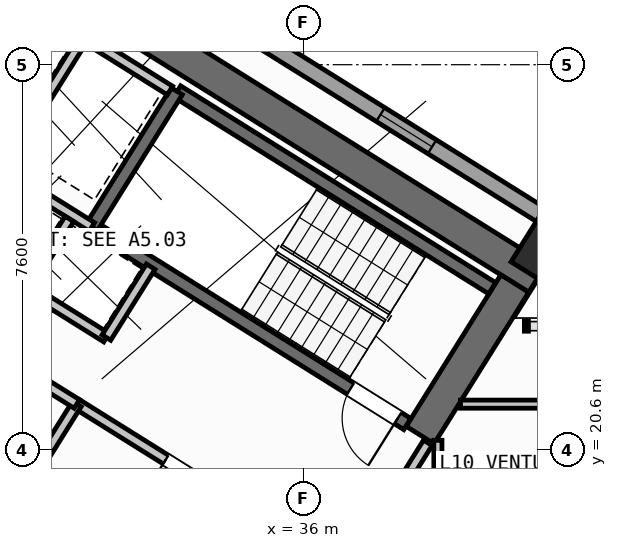
"""IFC4 building model, lengths in metres.
Left out: names, types, materials, properties, quantities, classifications, styles, units other than length and angle.
Written with IfcOpenShell. Run it as: python <this file> out.ifc"""

import sys

from ifc_helpers import new_model, si_unit, direction, frame, frame_2d, origin, origin_2d, place, context, subcontext, project, spatial, rectangle, hollow_rectangle, extrude, source, transform, mapped, element, fill, save


model = new_model("IFC4")
c1 = context("Model", 3, precision=1e-05, world=origin(), true_north=direction((0.0, 1.0)))
c2 = subcontext(c1, "Body", "Model", "MODEL_VIEW")
j1 = project(units=[si_unit("LENGTHUNIT", "METRE"), si_unit("PLANEANGLEUNIT", "RADIAN")], contexts=[c1])
p1 = place(None, origin())
s1 = spatial("IfcSite", under=j1, at=p1, CompositionType="ELEMENT")
p2 = place(p1, origin())
s2 = spatial("IfcBuilding", under=s1, at=p2, CompositionType="ELEMENT")
p3 = place(p2, frame((0.0, 0.0, 42.0)))
s3 = spatial("IfcBuildingStorey", under=s2, at=p3, CompositionType="ELEMENT", Elevation=42.0)
p4 = place(p3, frame((40.615, 23.983, 0.0), z_axis=(0.0, 0.0, 1.0), x_axis=(-0.848045953968, 0.529922692436, 0.0)))
e1 = element("IfcWall", 1, at=p4, inside=s3, PredefinedType="SHEAR", context=c2, shape_type="SweptSolid", body=[
    extrude(rectangle(XDim=13.24, YDim=0.65, at=frame_2d((6.62, 0.0))), origin(), (0.0, 0.0, 1.0), 3.35),
])
p5 = place(p3, frame((40.168, 23.88, 0.0), z_axis=(0.0, 0.0, 1.0), x_axis=(-0.529893103397, -0.8480644427, 0.0)))
e2 = element("IfcWall", 2, at=p5, inside=s3, PredefinedType="SHEAR", context=c2, shape_type="SweptSolid", body=[
    extrude(rectangle(XDim=3.525, YDim=0.65, at=frame_2d((1.763, 0.0))), origin(), (0.0, 0.0, 1.0), 3.35),
])
m1 = source(origin(), c2, "Body", "SweptSolid", [
    extrude(hollow_rectangle(XDim=1.0, YDim=1.0, WallThickness=0.04, at=origin_2d()), origin(), (0.0, 0.0, 1.0), 3.6),
])
p6 = place(p3, frame((40.783, 24.469, 0.0), z_axis=(0.0, 0.0, 1.0), x_axis=(-0.848048096156, 0.529919264233, 0.0)))
e3 = element("IfcColumn", 3, at=p6, inside=s3, PredefinedType="COLUMN", context=c2, shape_type="MappedRepresentation", body=[
    mapped(m1, transform((0.0, 0.0, 0.0), scale=1.0)),
])
p7 = place(p3, frame((14.138, 41.825, 0.0), z_axis=(0.0, 0.0, 1.0), x_axis=(0.848046498049, -0.529921821731, 0.0)))
e4 = element("IfcWall", 4, at=p7, inside=s3, PredefinedType="STANDARD", context=c2, shape_type="SweptSolid", body=[
    extrude(rectangle(XDim=31.588, YDim=0.32, at=frame_2d((15.794, 0.0))), origin(), (0.0, 0.0, 1.0), 3.35),
])
p8 = place(p7, frame((3.369, 0.0, 0.0)))
e5 = element("IfcOpeningElement", 5, at=p8, cuts=e4, PredefinedType="OPENING", context=c2, shape_type="SweptSolid", body=[
    extrude(rectangle(XDim=1.05, YDim=2.15, at=frame_2d((0.525, 1.075))), frame((0.0, 0.17, 0.0), z_axis=(0.0, -1.0, 0.0), x_axis=(1.0, 0.0, 0.0)), (0.0, 0.0, 1.0), 0.34),
])
p9 = place(p7, frame((0.946, 0.0, 0.85)))
e6 = element("IfcOpeningElement", 6, at=p9, cuts=e4, PredefinedType="OPENING", context=c2, shape_type="SweptSolid", body=[
    extrude(rectangle(XDim=1.8, YDim=1.5, at=frame_2d((0.9, 0.75))), frame((0.0, 0.17, 0.0), z_axis=(0.0, -1.0, 0.0), x_axis=(1.0, 0.0, 0.0)), (0.0, 0.0, 1.0), 0.34),
])
p10 = place(p7, frame((8.46, 0.0, 0.85)))
e7 = element("IfcOpeningElement", 7, at=p10, cuts=e4, PredefinedType="OPENING", context=c2, shape_type="SweptSolid", body=[
    extrude(rectangle(XDim=1.8, YDim=1.5, at=frame_2d((0.9, 0.75))), frame((0.0, 0.17, 0.0), z_axis=(0.0, -1.0, 0.0), x_axis=(1.0, 0.0, 0.0)), (0.0, 0.0, 1.0), 0.34),
])
p11 = place(p7, frame((13.899, 0.0, 0.85)))
e8 = element("IfcOpeningElement", 8, at=p11, cuts=e4, PredefinedType="OPENING", context=c2, shape_type="SweptSolid", body=[
    extrude(rectangle(XDim=1.5, YDim=1.5, at=frame_2d((0.75, 0.75))), frame((0.0, 0.17, 0.0), z_axis=(0.0, -1.0, 0.0), x_axis=(1.0, 0.0, 0.0)), (0.0, 0.0, 1.0), 0.34),
])
p12 = place(p7, frame((22.019, 0.0, 0.95)))
e9 = element("IfcOpeningElement", 9, at=p12, cuts=e4, PredefinedType="OPENING", context=c2, shape_type="SweptSolid", body=[
    extrude(rectangle(XDim=1.2, YDim=1.4, at=frame_2d((0.6, 0.7))), frame((0.0, 0.17, 0.0), z_axis=(0.0, -1.0, 0.0), x_axis=(1.0, 0.0, 0.0)), (0.0, 0.0, 1.0), 0.34),
])
p13 = place(p7, frame((27.569, 0.0, 0.95)))
e10 = element("IfcOpeningElement", 10, at=p13, cuts=e4, PredefinedType="OPENING", context=c2, shape_type="SweptSolid", body=[
    extrude(rectangle(XDim=1.2, YDim=1.4, at=frame_2d((0.6, 0.7))), frame((0.0, 0.17, 0.0), z_axis=(0.0, -1.0, 0.0), x_axis=(1.0, 0.0, 0.0)), (0.0, 0.0, 1.0), 0.34),
])
p14 = place(p3, frame((31.28, 18.261, 0.0), z_axis=(0.0, 0.0, 1.0), x_axis=(-0.848051618787, 0.529913626805, 0.0)))
e11 = element("IfcWall", 11, at=p14, inside=s3, PredefinedType="SHEAR", context=c2, shape_type="SweptSolid", body=[
    extrude(rectangle(XDim=7.46, YDim=0.26, at=frame_2d((3.73, 0.0))), origin(), (0.0, 0.0, 1.0), 3.35),
])
p15 = place(p14, frame((0.36, 0.0, 0.0)))
e12 = element("IfcOpeningElement", 12, at=p15, cuts=e11, PredefinedType="OPENING", context=c2, shape_type="SweptSolid", body=[
    extrude(rectangle(XDim=0.86, YDim=2.05, at=frame_2d((0.43, 1.025))), frame((0.0, 0.14, 0.0), z_axis=(0.0, -1.0, 0.0), x_axis=(1.0, 0.0, 0.0)), (0.0, 0.0, 1.0), 0.28),
])
p16 = place(p3, frame((39.721, 23.788, 0.0), z_axis=(0.0, 0.0, 1.0), x_axis=(-0.848054434086, 0.529909121291, 0.0)))
e13 = element("IfcWall", 13, at=p16, inside=s3, PredefinedType="SHEAR", context=c2, shape_type="SweptSolid", body=[
    extrude(rectangle(XDim=7.33, YDim=0.26, at=frame_2d((3.665, 0.0))), origin(), (0.0, 0.0, 1.0), 3.35),
])
p17 = place(p3, frame((38.046, 21.108, 0.0), z_axis=(0.0, 0.0, 1.0), x_axis=(-0.848054434086, 0.529909121291, 0.0)))
e14 = element("IfcWall", 14, at=p17, inside=s3, PredefinedType="SHEAR", context=c2, shape_type="SweptSolid", body=[
    extrude(rectangle(XDim=7.33, YDim=0.26, at=frame_2d((3.665, 0.0))), origin(), (0.0, 0.0, 1.0), 3.35),
])
p18 = place(p17, frame((0.22, 0.0, 0.0)))
e15 = element("IfcOpeningElement", 15, at=p18, cuts=e14, PredefinedType="OPENING", context=c2, shape_type="SweptSolid", body=[
    extrude(rectangle(XDim=1.1, YDim=2.1, at=frame_2d((0.55, 1.05))), frame((0.0, 0.14, 0.0), z_axis=(0.0, -1.0, 0.0), x_axis=(1.0, 0.0, 0.0)), (0.0, 0.0, 1.0), 0.28),
])
p19 = place(p3, frame((33.496, 27.677, 0.0), z_axis=(0.0, 0.0, 1.0), x_axis=(-0.529908658664, -0.84805472316, 0.0)))
e16 = element("IfcWall", 16, at=p19, inside=s3, PredefinedType="SHEAR", context=c2, shape_type="SweptSolid", body=[
    extrude(rectangle(XDim=3.16, YDim=0.26, at=frame_2d((1.58, 0.0))), origin(), (0.0, 0.0, 1.0), 3.35),
])
p20 = place(p3, frame((36.374, 18.474, 0.0), z_axis=(0.0, 0.0, 1.0), x_axis=(-0.848051071577, 0.529914502535, 0.0)))
e17 = element("IfcWall", 17, at=p20, inside=s3, PredefinedType="STANDARD", context=c2, shape_type="SweptSolid", body=[
    extrude(rectangle(XDim=5.718, YDim=0.2, at=frame_2d((2.859, 0.0))), origin(), (0.0, 0.0, 1.0), 3.34),
])
p21 = place(p20, frame((2.498, 0.0, 0.0)))
e18 = element("IfcOpeningElement", 18, at=p21, cuts=e17, PredefinedType="OPENING", context=c2, shape_type="SweptSolid", body=[
    extrude(rectangle(XDim=1.15, YDim=2.1, at=frame_2d((0.575, 1.05))), frame((0.0, 0.11, 0.0), z_axis=(0.0, -1.0, 0.0), x_axis=(1.0, 0.0, 0.0)), (0.0, 0.0, 1.0), 0.22),
])
p22 = place(p3, frame((31.822, 24.998, 0.0), z_axis=(0.0, 0.0, 1.0), x_axis=(-0.848058348634, 0.529902856485, 0.0)))
e19 = element("IfcWall", 19, at=p22, inside=s3, PredefinedType="STANDARD", context=c2, shape_type="SweptSolid", body=[
    extrude(rectangle(XDim=4.568, YDim=0.2, at=frame_2d((2.284, 0.0))), origin(), (0.0, 0.0, 1.0), 3.34),
])
p23 = place(p3, frame((32.108, 22.814, 0.0), z_axis=(0.0, 0.0, 1.0), x_axis=(-0.848042229521, 0.529928652696, 0.0)))
e20 = element("IfcWall", 20, at=p23, inside=s3, PredefinedType="STANDARD", context=c2, shape_type="SweptSolid", body=[
    extrude(rectangle(XDim=5.62, YDim=0.2, at=frame_2d((2.81, 0.0))), origin(), (0.0, 0.0, 1.0), 3.34),
])
p24 = place(p3, frame((32.982, 24.213, 0.0), z_axis=(0.0, 0.0, 1.0), x_axis=(-0.529839334948, -0.84809803628, 0.0)))
e21 = element("IfcWall", 21, at=p24, inside=s3, PredefinedType="STANDARD", context=c2, shape_type="SweptSolid", body=[
    extrude(rectangle(XDim=1.65, YDim=0.2, at=frame_2d((0.825, 0.0))), origin(), (0.0, 0.0, 1.0), 3.34),
])
p25 = place(p3, frame((31.645, 28.716, 0.0), z_axis=(0.0, 0.0, 1.0), x_axis=(-0.52986693015, -0.848080795876, 0.0)))
e22 = element("IfcWall", 22, at=p25, inside=s3, PredefinedType="STANDARD", context=c2, shape_type="SweptSolid", body=[
    extrude(rectangle(XDim=2.66, YDim=0.2, at=frame_2d((1.33, 0.0))), origin(), (0.0, 0.0, 1.0), 3.34),
])
p26 = place(p3, frame((33.363, 27.69, 0.0), z_axis=(0.0, 0.0, 1.0), x_axis=(-0.848053806312, 0.529910125964, 0.0)))
e23 = element("IfcWall", 23, at=p26, inside=s3, PredefinedType="STANDARD", context=c2, shape_type="SweptSolid", body=[
    extrude(rectangle(XDim=4.448, YDim=0.2, at=frame_2d((2.224, 0.0))), origin(), (0.0, 0.0, 1.0), 3.34),
])
p27 = place(p3, frame((31.379, 25.156, 0.0), z_axis=(0.0, 0.0, 1.0), x_axis=(-0.529998940003, -0.847998304005, 0.0)))
e24 = element("IfcWall", 24, at=p27, inside=s3, PredefinedType="STANDARD", context=c2, shape_type="SweptSolid", body=[
    extrude(rectangle(XDim=1.58, YDim=0.2, at=frame_2d((0.79, 0.0))), origin(), (0.0, 0.0, 1.0), 3.34),
])
p28 = place(p3, frame((31.525, 21.504, 0.0), z_axis=(0.0, 0.0, 1.0), x_axis=(-0.529907497854, -0.848055448493, 0.0)))
e25 = element("IfcWall", 25, at=p28, inside=s3, PredefinedType="STANDARD", context=c2, shape_type="SweptSolid", body=[
    extrude(rectangle(XDim=2.88, YDim=0.2, at=frame_2d((1.44, 0.0))), origin(), (0.0, 0.0, 1.0), 3.34),
])
p29 = place(p3, frame((31.525, 21.504, 0.0), z_axis=(0.0, 0.0, 1.0), x_axis=(-0.848044998614, 0.529924221305, 0.0)))
e26 = element("IfcWall", 26, at=p29, inside=s3, PredefinedType="STANDARD", context=c2, shape_type="SweptSolid", body=[
    extrude(rectangle(XDim=6.168, YDim=0.2, at=frame_2d((3.084, 0.0))), origin(), (0.0, 0.0, 1.0), 3.34),
])
p30 = place(p29, frame((4.4, 0.0, 0.0)))
e27 = element("IfcOpeningElement", 27, at=p30, cuts=e26, PredefinedType="OPENING", context=c2, shape_type="SweptSolid", body=[
    extrude(rectangle(XDim=0.86, YDim=2.05, at=frame_2d((0.43, 1.025))), frame((0.0, 0.11, 0.0), z_axis=(0.0, -1.0, 0.0), x_axis=(1.0, 0.0, 0.0)), (0.0, 0.0, 1.0), 0.22),
])
p31 = place(p29, frame((1.45, 0.0, 0.0)))
e28 = element("IfcOpeningElement", 28, at=p31, cuts=e26, PredefinedType="OPENING", context=c2, shape_type="SweptSolid", body=[
    extrude(rectangle(XDim=0.86, YDim=2.05, at=frame_2d((0.43, 1.025))), frame((0.0, 0.11, 0.0), z_axis=(0.0, -1.0, 0.0), x_axis=(1.0, 0.0, 0.0)), (0.0, 0.0, 1.0), 0.22),
])
p32 = place(p3, frame((38.451, 20.737, 0.0), z_axis=(0.0, 0.0, 1.0), x_axis=(-0.529924799939, -0.848044637038, 0.0)))
e29 = element("IfcWall", 29, at=p32, inside=s3, PredefinedType="STANDARD", context=c2, shape_type="SweptSolid", body=[
    extrude(rectangle(XDim=2.96, YDim=0.2, at=frame_2d((1.48, 0.0))), origin(), (0.0, 0.0, 1.0), 3.34),
])
p33 = place(p32, frame((1.46, 0.0, 0.0)))
e30 = element("IfcOpeningElement", 30, at=p33, cuts=e29, PredefinedType="OPENING", context=c2, shape_type="SweptSolid", body=[
    extrude(rectangle(XDim=0.86, YDim=2.05, at=frame_2d((0.43, 1.025))), frame((0.0, 0.11, 0.0), z_axis=(0.0, -1.0, 0.0), x_axis=(1.0, 0.0, 0.0)), (0.0, 0.0, 1.0), 0.22),
])
p34 = place(p3, frame((38.65, 17.93, 0.0), z_axis=(0.0, 0.0, 1.0), x_axis=(0.0, 1.0, 0.0)))
e31 = element("IfcWall", 31, at=p34, inside=s3, PredefinedType="PARTITIONING", context=c2, shape_type="SweptSolid", body=[
    extrude(rectangle(XDim=2.857, YDim=0.16, at=frame_2d((1.428, 0.0))), origin(), (0.0, 0.0, 1.0), 3.34),
])
p35 = place(p3, frame((39.095, 21.5, 0.0), z_axis=(0.0, 0.0, 1.0), x_axis=(1.0, 0.0, 0.0)))
e32 = element("IfcWall", 32, at=p35, inside=s3, PredefinedType="PARTITIONING", context=c2, shape_type="SweptSolid", body=[
    extrude(rectangle(XDim=7.094, YDim=0.16, at=frame_2d((3.547, 0.0))), origin(), (0.0, 0.0, 1.0), 3.34),
])
m2 = source(origin(), c2, "Body", "SweptSolid", [
    extrude(rectangle(XDim=1.2, YDim=1.4, at=frame_2d((0.6, 0.7))), frame((0.0, 0.03, 0.0), z_axis=(0.0, -1.0, 0.0), x_axis=(1.0, 0.0, 0.0)), (0.0, 0.0, 1.0), 0.06),
])
p36 = place(p13, origin())
e33 = element("IfcWindow", 33, at=p36, inside=s3, PartitioningType="SINGLE_PANEL", PredefinedType="WINDOW", context=c2, shape_type="MappedRepresentation", body=[
    mapped(m2, transform((0.0, 0.0, 0.0), scale=1.0)),
])
fill(e10, e33)
m3 = source(origin(), c2, "Body", "SweptSolid", [
    extrude(rectangle(XDim=1.1, YDim=2.1, at=frame_2d((0.55, 1.05))), frame((0.0, 0.025, 0.0), z_axis=(0.0, -1.0, 0.0), x_axis=(1.0, 0.0, 0.0)), (0.0, 0.0, 1.0), 0.05),
])
p37 = place(p18, origin())
e34 = element("IfcDoor", 34, at=p37, inside=s3, OperationType="SINGLE_SWING_LEFT", PredefinedType="DOOR", context=c2, shape_type="MappedRepresentation", body=[
    mapped(m3, transform((0.0, 0.0, 0.0), scale=1.0)),
])
fill(e15, e34)
m4 = source(origin(), c2, "Body", "SweptSolid", [
    extrude(rectangle(XDim=1.15, YDim=2.1, at=frame_2d((0.575, 1.05))), frame((0.0, 0.025, 0.0), z_axis=(0.0, -1.0, 0.0), x_axis=(1.0, 0.0, 0.0)), (0.0, 0.0, 1.0), 0.05),
])
p38 = place(p21, origin())
e35 = element("IfcDoor", 35, at=p38, inside=s3, OperationType="SINGLE_SWING_RIGHT", PredefinedType="DOOR", context=c2, shape_type="MappedRepresentation", body=[
    mapped(m4, transform((0.0, 0.0, 0.0), scale=1.0)),
])
fill(e18, e35)
save(model, sys.argv[1])
